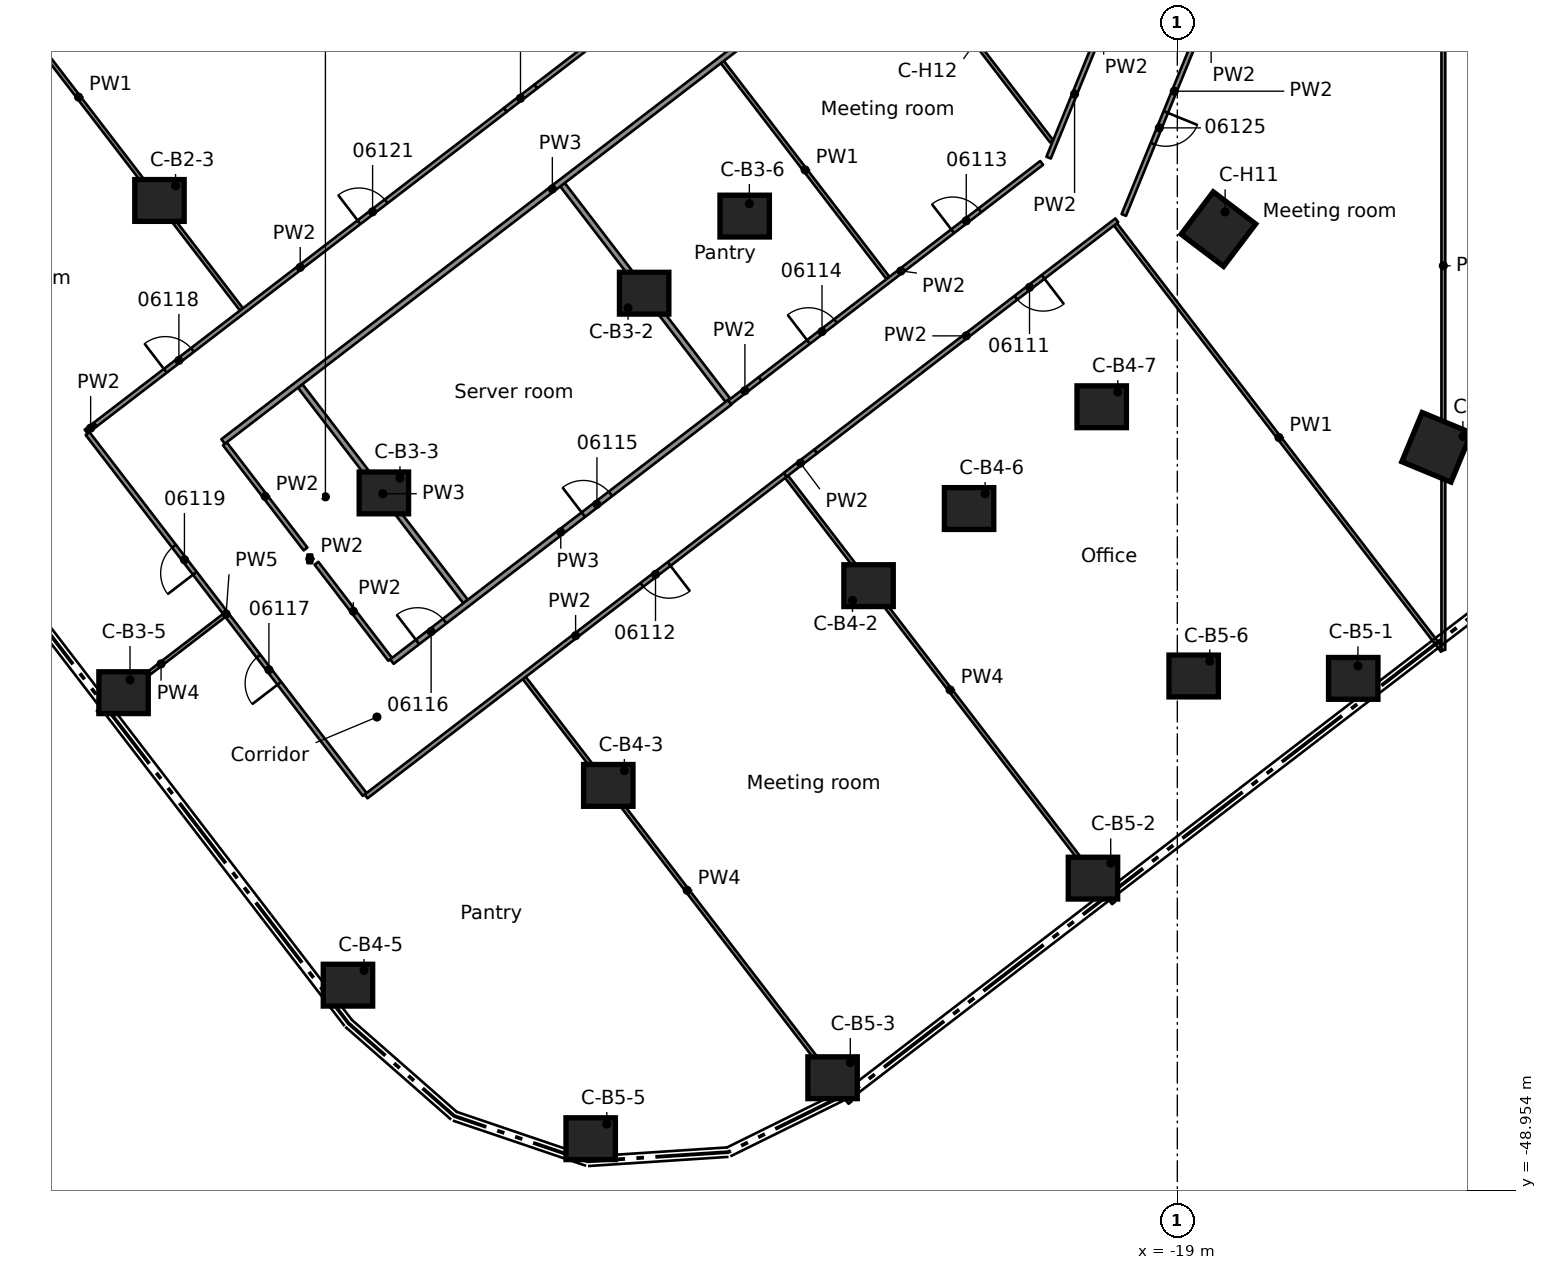
"""IFC4 building model, lengths in metres.
Left out: names, types, materials, properties, quantities, classifications, styles, units other than length and angle.
Written with IfcOpenShell. Run it as: python <this file> out.ifc"""

import sys

from ifc_helpers import new_model, si_unit, direction, frame, frame_2d, origin, origin_2d, place, context, subcontext, project, spatial, rectangle, extrude, element, fill, save


model = new_model("IFC4")
c1 = context("Model", 3, precision=1e-05, world=origin(), true_north=direction((0.0, 1.0)))
c2 = subcontext(c1, "Body", "Model", "MODEL_VIEW")
j1 = project(units=[si_unit("LENGTHUNIT", "METRE"), si_unit("PLANEANGLEUNIT", "RADIAN")], contexts=[c1])
p1 = place(None, origin())
s1 = spatial("IfcSite", under=j1, at=p1, CompositionType="ELEMENT")
p2 = place(p1, origin())
s2 = spatial("IfcBuilding", under=s1, at=p2, CompositionType="ELEMENT")
p3 = place(p2, frame((0.0, 0.0, 29.2)))
s3 = spatial("IfcBuildingStorey", under=s2, at=p3, CompositionType="ELEMENT", Elevation=29.2)
for number, where, z_axis, x_axis in (
    (1, (-45.784, -22.905, 0.0), (0.0, 0.0, 1.0), (1.0, 0.0, 0.0)),
    (2, (-33.03, -25.345, 0.0), (0.0, 0.0, 1.0), (1.0, 0.0, 0.0)),
    (3, (-39.879, -30.6, 0.0), (0.0, 0.0, 1.0), (1.0, 0.0, 0.0)),
    (4, (-46.729, -35.856, 0.0), (0.0, 0.0, 1.0), (1.0, 0.0, 0.0)),
    (5, (-30.385, -23.316, 0.0), (0.0, 0.0, 1.0), (1.0, 0.0, 0.0)),
    (6, (-27.125, -33.04, 0.0), (0.0, 0.0, 1.0), (1.0, 0.0, 0.0)),
    (7, (-33.974, -38.296, 0.0), (0.0, 0.0, 1.0), (1.0, 0.0, 0.0)),
    (8, (-40.824, -43.552, 0.0), (0.0, 0.0, 1.0), (1.0, 0.0, 0.0)),
    (9, (-24.48, -31.011, 0.0), (0.0, 0.0, 1.0), (1.0, 0.0, 0.0)),
    (10, (-20.99, -28.333, 0.0), (0.0, 0.0, 1.0), (1.0, 0.0, 0.0)),
    (11, (-14.371, -35.48, 0.0), (0.0, 0.0, 1.0), (1.0, 0.0, 0.0)),
    (12, (-21.22, -40.736, 0.0), (0.0, 0.0, 1.0), (1.0, 0.0, 0.0)),
    (13, (-28.072, -45.988, 0.0), (0.0, 0.0, 1.0), (1.0, 0.0, 0.0)),
    (14, (-34.437, -47.592, 0.0), (0.0, 0.0, 1.0), (1.0, 0.0, 0.0)),
    (15, (-18.57, -35.417, 0.0), (0.0, 0.0, 1.0), (1.0, 0.0, 0.0)),
):
    element("IfcColumn", number, at=place(p3, frame(where, z_axis=z_axis, x_axis=x_axis)), inside=s3, PredefinedType="COLUMN", context=c2, shape_type="SweptSolid", body=[
        extrude(rectangle(XDim=1.3, YDim=1.1, at=origin_2d()), origin(), (0.0, 0.0, 1.0), 4.1),
    ])
for number, where, z_axis, x_axis in (
    (16, (-12.178, -29.4, 0.0), (0.0, 0.0, 1.0), (-0.383, -0.924, 0.0)),
    (17, (-17.919, -23.659, 0.0), (0.0, 0.0, 1.0), (-0.604, -0.797, 0.0)),
):
    element("IfcColumn", number, at=place(p3, frame(where, z_axis=z_axis, x_axis=x_axis)), inside=s3, PredefinedType="COLUMN", context=c2, shape_type="SweptSolid", body=[
        extrude(rectangle(XDim=1.4, YDim=1.4, at=origin_2d()), origin(), (0.0, 0.0, 1.0), 4.1),
    ])
p4 = place(p3, frame((-40.384, -38.535, 0.0), z_axis=(0.0, 0.0, 1.0), x_axis=(-0.609026744184, 0.793149686294, 0.0)))
e18 = element("IfcWall", 18, at=p4, inside=s3, PredefinedType="PARTITIONING", context=c2, shape_type="SweptSolid", body=[
    extrude(rectangle(XDim=11.975, YDim=0.125, at=frame_2d((5.987, 0.0))), origin(), (0.0, 0.0, 1.0), 3.049),
])
p5 = place(p4, frame((3.688, 0.0, 0.0)))
e19 = element("IfcOpeningElement", 19, at=p5, cuts=e18, PredefinedType="OPENING", context=c2, shape_type="SweptSolid", body=[
    extrude(rectangle(XDim=0.9, YDim=2.1, at=frame_2d((0.45, 1.05))), frame((0.0, 0.073, 0.0), z_axis=(0.0, -1.0, 0.0), x_axis=(1.0, 0.0, 0.0)), (0.0, 0.0, 1.0), 0.145),
])
p6 = place(p4, frame((7.338, 0.0, 0.0)))
e20 = element("IfcOpeningElement", 20, at=p6, cuts=e18, PredefinedType="OPENING", context=c2, shape_type="SweptSolid", body=[
    extrude(rectangle(XDim=0.9, YDim=2.1, at=frame_2d((0.45, 1.05))), frame((0.0, 0.073, 0.0), z_axis=(0.0, -1.0, 0.0), x_axis=(1.0, 0.0, 0.0)), (0.0, 0.0, 1.0), 0.145),
])
p7 = place(p3, frame((-44.064, -29.307, 0.0), z_axis=(0.0, 0.0, 1.0), x_axis=(0.608587271244, -0.793486945879, 0.0)))
e21 = element("IfcWall", 21, at=p7, inside=s3, PredefinedType="PARTITIONING", context=c2, shape_type="SweptSolid", body=[
    extrude(rectangle(XDim=3.489, YDim=0.125, at=frame_2d((1.744, 0.0))), origin(), (0.0, 0.0, 1.0), 3.66),
])
p8 = place(p3, frame((-41.653, -32.45, 0.0), z_axis=(0.0, 0.0, 1.0), x_axis=(0.60867753108, -0.793417710389, 0.0)))
e22 = element("IfcWall", 22, at=p8, inside=s3, PredefinedType="PARTITIONING", context=c2, shape_type="SweptSolid", body=[
    extrude(rectangle(XDim=3.188, YDim=0.125, at=frame_2d((1.594, 0.0))), origin(), (0.0, 0.0, 1.0), 3.66),
])
p9 = place(p3, frame((-52.2, -14.599, 0.0), z_axis=(0.0, 0.0, 1.0), x_axis=(0.608818023879, -0.793309910312, 0.0)))
e23 = element("IfcWall", 23, at=p9, inside=s3, PredefinedType="PARTITIONING", context=c2, shape_type="SweptSolid", body=[
    extrude(rectangle(XDim=14.081, YDim=0.1, at=frame_2d((7.041, 0.0))), origin(), (0.0, 0.0, 1.0), 3.66),
])
p10 = place(p3, frame((-42.081, -27.786, 0.0), z_axis=(0.0, 0.0, 1.0), x_axis=(0.608779288924, -0.793339635577, 0.0)))
e24 = element("IfcWall", 24, at=p10, inside=s3, PredefinedType="PARTITIONING", context=c2, shape_type="SweptSolid", body=[
    extrude(rectangle(XDim=7.147, YDim=0.15, at=frame_2d((3.574, 0.0))), origin(), (0.0, 0.0, 1.0), 3.66),
])
p11 = place(p3, frame((-36.184, -35.471, 0.0), z_axis=(0.0, 0.0, 1.0), x_axis=(0.608732507749, -0.793375531517, 0.0)))
e25 = element("IfcWall", 25, at=p11, inside=s3, PredefinedType="PARTITIONING", context=c2, shape_type="SweptSolid", body=[
    extrude(rectangle(XDim=14.082, YDim=0.1, at=frame_2d((7.041, 0.0))), origin(), (0.0, 0.0, 1.0), 3.025),
])
p12 = place(p3, frame((-35.179, -22.489, 0.0), z_axis=(0.0, 0.0, 1.0), x_axis=(0.608729798771, -0.793377610024, 0.0)))
e26 = element("IfcWall", 26, at=p12, inside=s3, PredefinedType="PARTITIONING", context=c2, shape_type="SweptSolid", body=[
    extrude(rectangle(XDim=7.148, YDim=0.15, at=frame_2d((3.574, 0.0))), origin(), (0.0, 0.0, 1.0), 3.66),
])
p13 = place(p3, frame((-29.282, -30.176, 0.0), z_axis=(0.0, 0.0, 1.0), x_axis=(0.608773787241, -0.793343857333, 0.0)))
e27 = element("IfcWall", 27, at=p13, inside=s3, PredefinedType="PARTITIONING", context=c2, shape_type="SweptSolid", body=[
    extrude(rectangle(XDim=14.135, YDim=0.1, at=frame_2d((7.067, 0.0))), origin(), (0.0, 0.0, 1.0), 3.025),
])
p14 = place(p3, frame((-30.975, -19.261, 0.0), z_axis=(0.0, 0.0, 1.0), x_axis=(0.60876639971, -0.793349526113, 0.0)))
e28 = element("IfcWall", 28, at=p14, inside=s3, PredefinedType="PARTITIONING", context=c2, shape_type="SweptSolid", body=[
    extrude(rectangle(XDim=7.162, YDim=0.1, at=frame_2d((3.581, 0.0))), origin(), (0.0, 0.0, 1.0), 3.66),
])
p15 = place(p3, frame((-26.44, -15.962, 0.0), z_axis=(0.0, 0.0, 1.0), x_axis=(0.608697215762, -0.79340260872, 0.0)))
e29 = element("IfcWall", 29, at=p15, inside=s3, PredefinedType="PARTITIONING", context=c2, shape_type="SweptSolid", body=[
    extrude(rectangle(XDim=6.79, YDim=0.1, at=frame_2d((3.395, 0.0))), origin(), (0.0, 0.0, 1.0), 3.66),
])
p16 = place(p3, frame((-20.629, -23.535, 0.0), z_axis=(0.0, 0.0, 1.0), x_axis=(0.608775561638, -0.793342495743, 0.0)))
e30 = element("IfcWall", 30, at=p16, inside=s3, PredefinedType="PARTITIONING", context=c2, shape_type="SweptSolid", body=[
    extrude(rectangle(XDim=14.136, YDim=0.1, at=frame_2d((7.068, 0.0))), origin(), (0.0, 0.0, 1.0), 3.66),
])
p17 = place(p3, frame((-29.32, -30.124, 0.0), z_axis=(0.0, 0.0, 1.0), x_axis=(0.793776779764, 0.608209194198, 0.0)))
e31 = element("IfcWall", 31, at=p17, inside=s3, PredefinedType="PARTITIONING", context=c2, shape_type="SweptSolid", body=[
    extrude(rectangle(XDim=1.014, YDim=0.125, at=frame_2d((0.507, 0.0))), origin(), (0.0, 0.0, 1.0), 3.66),
])
p18 = place(p3, frame((-29.32, -30.127, 0.0), z_axis=(0.0, 0.0, 1.0), x_axis=(-0.793456491448, -0.608626976217, 0.0)))
e32 = element("IfcWall", 32, at=p18, inside=s3, PredefinedType="PARTITIONING", context=c2, shape_type="SweptSolid", body=[
    extrude(rectangle(XDim=13.898, YDim=0.125, at=frame_2d((6.949, 0.0))), origin(), (0.0, 0.0, 1.0), 3.66),
])
p19 = place(p18, frame((3.849, 0.0, 0.0)))
e33 = element("IfcOpeningElement", 33, at=p19, cuts=e32, PredefinedType="OPENING", context=c2, shape_type="SweptSolid", body=[
    extrude(rectangle(XDim=0.9, YDim=2.1, at=frame_2d((0.45, 1.05))), frame((0.0, 0.073, 0.0), z_axis=(0.0, -1.0, 0.0), x_axis=(1.0, 0.0, 0.0)), (0.0, 0.0, 1.0), 0.145),
])
p20 = place(p3, frame((-20.593, -23.428, 0.0), z_axis=(0.0, 0.0, 1.0), x_axis=(-0.793332393454, -0.608788726486, 0.0)))
e34 = element("IfcWall", 34, at=p20, inside=s3, PredefinedType="PARTITIONING", context=c2, shape_type="SweptSolid", body=[
    extrude(rectangle(XDim=9.986, YDim=0.125, at=frame_2d((4.993, 0.0))), origin(), (0.0, 0.0, 1.0), 3.66),
])
p21 = place(p20, frame((2.445, 0.0, 0.0)))
e35 = element("IfcOpeningElement", 35, at=p21, cuts=e34, PredefinedType="OPENING", context=c2, shape_type="SweptSolid", body=[
    extrude(rectangle(XDim=0.9, YDim=2.1, at=frame_2d((0.45, 1.05))), frame((0.0, 0.073, 0.0), z_axis=(0.0, -1.0, 0.0), x_axis=(1.0, 0.0, 0.0)), (0.0, 0.0, 1.0), 0.145),
])
p22 = place(p3, frame((-30.782, -28.22, 0.0), z_axis=(0.0, 0.0, 1.0), x_axis=(0.793579274907, 0.608466872096, 0.0)))
e36 = element("IfcWall", 36, at=p22, inside=s3, PredefinedType="PARTITIONING", context=c2, shape_type="SweptSolid", body=[
    extrude(rectangle(XDim=1.016, YDim=0.125, at=frame_2d((0.508, 0.0))), origin(), (0.0, 0.0, 1.0), 3.66),
])
p23 = place(p3, frame((-39.667, -35.038, 0.0), z_axis=(0.0, 0.0, 1.0), x_axis=(0.793293656215, 0.608839202917, 0.0)))
e37 = element("IfcWall", 37, at=p23, inside=s3, PredefinedType="PARTITIONING", context=c2, shape_type="SweptSolid", body=[
    extrude(rectangle(XDim=11.2, YDim=0.15, at=frame_2d((5.6, 0.0))), origin(), (0.0, 0.0, 1.0), 3.66),
])
p24 = place(p23, frame((6.35, 0.0, 0.0)))
e38 = element("IfcOpeningElement", 38, at=p24, cuts=e37, PredefinedType="OPENING", context=c2, shape_type="SweptSolid", body=[
    extrude(rectangle(XDim=0.9, YDim=2.1, at=frame_2d((0.45, 1.05))), frame((0.0, 0.085, 0.0), z_axis=(0.0, -1.0, 0.0), x_axis=(1.0, 0.0, 0.0)), (0.0, 0.0, 1.0), 0.17),
])
p25 = place(p23, frame((0.85, 0.0, 0.0)))
e39 = element("IfcOpeningElement", 39, at=p25, cuts=e37, PredefinedType="OPENING", context=c2, shape_type="SweptSolid", body=[
    extrude(rectangle(XDim=0.9, YDim=2.1, at=frame_2d((0.45, 1.05))), frame((0.0, 0.085, 0.0), z_axis=(0.0, -1.0, 0.0), x_axis=(1.0, 0.0, 0.0)), (0.0, 0.0, 1.0), 0.17),
])
p26 = place(p3, frame((-29.976, -27.602, 0.0), z_axis=(0.0, 0.0, 1.0), x_axis=(0.793237948633, 0.608911780843, 0.0)))
e40 = element("IfcWall", 40, at=p26, inside=s3, PredefinedType="PARTITIONING", context=c2, shape_type="SweptSolid", body=[
    extrude(rectangle(XDim=9.336, YDim=0.125, at=frame_2d((4.668, 0.0))), origin(), (0.0, 0.0, 1.0), 3.66),
])
p27 = place(p26, frame((6.385, 0.0, 0.0)))
e41 = element("IfcOpeningElement", 41, at=p27, cuts=e40, PredefinedType="OPENING", context=c2, shape_type="SweptSolid", body=[
    extrude(rectangle(XDim=0.9, YDim=2.1, at=frame_2d((0.45, 1.05))), frame((0.0, 0.073, 0.0), z_axis=(0.0, -1.0, 0.0), x_axis=(1.0, 0.0, 0.0)), (0.0, 0.0, 1.0), 0.145),
])
p28 = place(p26, frame((1.6, 0.0, 0.0)))
e42 = element("IfcOpeningElement", 42, at=p28, cuts=e40, PredefinedType="OPENING", context=c2, shape_type="SweptSolid", body=[
    extrude(rectangle(XDim=0.9, YDim=2.1, at=frame_2d((0.45, 1.05))), frame((0.0, 0.073, 0.0), z_axis=(0.0, -1.0, 0.0), x_axis=(1.0, 0.0, 0.0)), (0.0, 0.0, 1.0), 0.145),
])
p29 = place(p3, frame((-47.403, -36.374, 0.0), z_axis=(0.0, 0.0, 1.0), x_axis=(0.793154740431, 0.609020162008, 0.0)))
e43 = element("IfcWall", 43, at=p29, inside=s3, PredefinedType="PARTITIONING", context=c2, shape_type="SweptSolid", body=[
    extrude(rectangle(XDim=4.187, YDim=0.1, at=frame_2d((2.094, 0.0))), origin(), (0.0, 0.0, 1.0), 3.025),
])
p30 = place(p3, frame((-44.11, -29.247, 0.0), z_axis=(0.0, 0.0, 1.0), x_axis=(0.793471030698, 0.608608021179, 0.0)))
e44 = element("IfcWall", 44, at=p30, inside=s3, PredefinedType="PARTITIONING", context=c2, shape_type="SweptSolid", body=[
    extrude(rectangle(XDim=21.838, YDim=0.15, at=frame_2d((10.919, 0.0))), origin(), (0.0, 0.0, 1.0), 3.66),
])
p31 = place(p3, frame((-36.687, -20.524, 0.0), z_axis=(0.0, 0.0, 1.0), x_axis=(0.793579274907, 0.608466872096, 0.0)))
e45 = element("IfcWall", 45, at=p31, inside=s3, PredefinedType="PARTITIONING", context=c2, shape_type="SweptSolid", body=[
    extrude(rectangle(XDim=1.016, YDim=0.125, at=frame_2d((0.508, 0.0))), origin(), (0.0, 0.0, 1.0), 3.66),
])
p32 = place(p3, frame((-47.476, -28.803, 0.0), z_axis=(0.0, 0.0, 1.0), x_axis=(0.793430085013, 0.608661400284, 0.0)))
e46 = element("IfcWall", 46, at=p32, inside=s3, PredefinedType="PARTITIONING", context=c2, shape_type="SweptSolid", body=[
    extrude(rectangle(XDim=13.6, YDim=0.125, at=frame_2d((6.8, 0.0))), origin(), (0.0, 0.0, 1.0), 3.66),
])
p33 = place(p32, frame((2.326, 0.0, 0.0)))
e47 = element("IfcOpeningElement", 47, at=p33, cuts=e46, PredefinedType="OPENING", context=c2, shape_type="SweptSolid", body=[
    extrude(rectangle(XDim=0.9, YDim=2.1, at=frame_2d((0.45, 1.05))), frame((0.0, 0.073, 0.0), z_axis=(0.0, -1.0, 0.0), x_axis=(1.0, 0.0, 0.0)), (0.0, 0.0, 1.0), 0.145),
])
p34 = place(p32, frame((8.75, 0.0, 0.0)))
e48 = element("IfcOpeningElement", 48, at=p34, cuts=e46, PredefinedType="OPENING", context=c2, shape_type="SweptSolid", body=[
    extrude(rectangle(XDim=0.9, YDim=2.1, at=frame_2d((0.45, 1.05))), frame((0.0, 0.073, 0.0), z_axis=(0.0, -1.0, 0.0), x_axis=(1.0, 0.0, 0.0)), (0.0, 0.0, 1.0), 0.145),
])
p35 = place(p3, frame((-35.881, -19.906, 0.0), z_axis=(0.0, 0.0, 1.0), x_axis=(0.793491146474, 0.608581794394, 0.0)))
e49 = element("IfcWall", 49, at=p35, inside=s3, PredefinedType="PARTITIONING", context=c2, shape_type="SweptSolid", body=[
    extrude(rectangle(XDim=9.892, YDim=0.125, at=frame_2d((4.946, 0.0))), origin(), (0.0, 0.0, 1.0), 3.66),
])
p36 = place(p35, frame((6.634, 0.0, 0.0)))
e50 = element("IfcOpeningElement", 50, at=p36, cuts=e49, PredefinedType="OPENING", context=c2, shape_type="SweptSolid", body=[
    extrude(rectangle(XDim=1.1, YDim=2.1, at=frame_2d((0.55, 1.05))), frame((0.0, 0.073, 0.0), z_axis=(0.0, -1.0, 0.0), x_axis=(1.0, 0.0, 0.0)), (0.0, 0.0, 1.0), 0.145),
])
p37 = place(p3, frame((-47.714, -28.986, 0.0), z_axis=(0.0, 0.0, 1.0), x_axis=(0.792623989105, 0.60971076085, 0.0)))
e51 = element("IfcWall", 51, at=p37, inside=s3, PredefinedType="PARTITIONING", context=c2, shape_type="SweptSolid", body=[
    extrude(rectangle(XDim=0.3, YDim=0.125, at=frame_2d((0.15, 0.0))), origin(), (0.0, 0.0, 1.0), 3.66),
])
p38 = place(p3, frame((-18.51, -18.634, 0.0), z_axis=(0.0, 0.0, 1.0), x_axis=(-0.377847706778, -0.925867760797, 0.0)))
e52 = element("IfcWall", 52, at=p38, inside=s3, PredefinedType="PARTITIONING", context=c2, shape_type="SweptSolid", body=[
    extrude(rectangle(XDim=5.026, YDim=0.125, at=frame_2d((2.513, 0.0))), origin(), (0.0, 0.0, 1.0), 3.66),
])
p39 = place(p38, frame((2.1, 0.0, 0.0)))
e53 = element("IfcOpeningElement", 53, at=p39, cuts=e52, PredefinedType="OPENING", context=c2, shape_type="SweptSolid", body=[
    extrude(rectangle(XDim=0.9, YDim=2.1, at=frame_2d((0.45, 1.05))), frame((0.0, 0.073, 0.0), z_axis=(0.0, -1.0, 0.0), x_axis=(1.0, 0.0, 0.0)), (0.0, 0.0, 1.0), 0.145),
])
p40 = place(p3, frame((-22.387, -21.778, 0.0), z_axis=(0.0, 0.0, 1.0), x_axis=(0.377843834017, 0.925869341265, 0.0)))
e54 = element("IfcWall", 54, at=p40, inside=s3, PredefinedType="PARTITIONING", context=c2, shape_type="SweptSolid", body=[
    extrude(rectangle(XDim=3.615, YDim=0.125, at=frame_2d((1.808, 0.0))), origin(), (0.0, 0.0, 1.0), 3.66),
])
p41 = place(p3, frame((-12.0, -34.733, 0.0), z_axis=(0.0, 0.0, 1.0), x_axis=(0.0, 1.0, 0.0)))
e55 = element("IfcWall", 55, at=p41, inside=s3, PredefinedType="PARTITIONING", context=c2, shape_type="SweptSolid", body=[
    extrude(rectangle(XDim=20.219, YDim=0.1, at=frame_2d((10.109, 0.0))), origin(), (0.0, 0.0, 1.0), 3.025),
])
p42 = place(p3, frame((-41.828, -32.449, 0.0), z_axis=(0.0, 0.0, 1.0), x_axis=(0.0, 1.0, 0.0)))
e56 = element("IfcWall", 56, at=p42, inside=s3, PredefinedType="PARTITIONING", context=c2, shape_type="SweptSolid", body=[
    extrude(rectangle(XDim=0.228, YDim=0.125, at=frame_2d((0.114, 0.0))), origin(), (0.0, 0.0, 1.0), 3.66),
])
p43 = place(p21, origin())
e57 = element("IfcDoor", 57, at=p43, inside=s3, OperationType="SINGLE_SWING_LEFT", PredefinedType="DOOR", context=c2, shape_type="SweptSolid", body=[
    extrude(rectangle(XDim=0.9, YDim=2.1, at=frame_2d((0.45, 1.05))), frame((0.0, 0.025, 0.0), z_axis=(0.0, -1.0, 0.0), x_axis=(1.0, 0.0, 0.0)), (0.0, 0.0, 1.0), 0.05),
])
fill(e35, e57)
p44 = place(p19, origin())
e58 = element("IfcDoor", 58, at=p44, inside=s3, OperationType="SINGLE_SWING_LEFT", PredefinedType="DOOR", context=c2, shape_type="SweptSolid", body=[
    extrude(rectangle(XDim=0.9, YDim=2.1, at=frame_2d((0.45, 1.05))), frame((0.0, 0.025, 0.0), z_axis=(0.0, -1.0, 0.0), x_axis=(1.0, 0.0, 0.0)), (0.0, 0.0, 1.0), 0.05),
])
fill(e33, e58)
p45 = place(p27, origin())
e59 = element("IfcDoor", 59, at=p45, inside=s3, OperationType="SINGLE_SWING_RIGHT", PredefinedType="DOOR", context=c2, shape_type="SweptSolid", body=[
    extrude(rectangle(XDim=0.9, YDim=2.1, at=frame_2d((0.45, 1.05))), frame((0.0, 0.025, 0.0), z_axis=(0.0, -1.0, 0.0), x_axis=(1.0, 0.0, 0.0)), (0.0, 0.0, 1.0), 0.05),
])
fill(e41, e59)
p46 = place(p28, origin())
e60 = element("IfcDoor", 60, at=p46, inside=s3, OperationType="SINGLE_SWING_LEFT", PredefinedType="DOOR", context=c2, shape_type="SweptSolid", body=[
    extrude(rectangle(XDim=0.9, YDim=2.1, at=frame_2d((0.45, 1.05))), frame((0.0, 0.025, 0.0), z_axis=(0.0, -1.0, 0.0), x_axis=(1.0, 0.0, 0.0)), (0.0, 0.0, 1.0), 0.05),
])
fill(e42, e60)
p47 = place(p24, origin())
e61 = element("IfcDoor", 61, at=p47, inside=s3, OperationType="SINGLE_SWING_RIGHT", PredefinedType="DOOR", context=c2, shape_type="SweptSolid", body=[
    extrude(rectangle(XDim=0.9, YDim=2.1, at=frame_2d((0.45, 1.05))), frame((0.0, 0.025, 0.0), z_axis=(0.0, -1.0, 0.0), x_axis=(1.0, 0.0, 0.0)), (0.0, 0.0, 1.0), 0.05),
])
fill(e38, e61)
p48 = place(p25, origin())
e62 = element("IfcDoor", 62, at=p48, inside=s3, OperationType="SINGLE_SWING_LEFT", PredefinedType="DOOR", context=c2, shape_type="SweptSolid", body=[
    extrude(rectangle(XDim=0.9, YDim=2.1, at=frame_2d((0.45, 1.05))), frame((0.0, 0.025, 0.0), z_axis=(0.0, -1.0, 0.0), x_axis=(1.0, 0.0, 0.0)), (0.0, 0.0, 1.0), 0.05),
])
fill(e39, e62)
p49 = place(p5, origin())
e63 = element("IfcDoor", 63, at=p49, inside=s3, OperationType="SINGLE_SWING_LEFT", PredefinedType="DOOR", context=c2, shape_type="SweptSolid", body=[
    extrude(rectangle(XDim=0.9, YDim=2.1, at=frame_2d((0.45, 1.05))), frame((0.0, 0.025, 0.0), z_axis=(0.0, -1.0, 0.0), x_axis=(1.0, 0.0, 0.0)), (0.0, 0.0, 1.0), 0.05),
])
fill(e19, e63)
p50 = place(p33, origin())
e64 = element("IfcDoor", 64, at=p50, inside=s3, OperationType="SINGLE_SWING_LEFT", PredefinedType="DOOR", context=c2, shape_type="SweptSolid", body=[
    extrude(rectangle(XDim=0.9, YDim=2.1, at=frame_2d((0.45, 1.05))), frame((0.0, 0.025, 0.0), z_axis=(0.0, -1.0, 0.0), x_axis=(1.0, 0.0, 0.0)), (0.0, 0.0, 1.0), 0.05),
])
fill(e47, e64)
p51 = place(p6, origin())
e65 = element("IfcDoor", 65, at=p51, inside=s3, OperationType="SINGLE_SWING_RIGHT", PredefinedType="DOOR", context=c2, shape_type="SweptSolid", body=[
    extrude(rectangle(XDim=0.9, YDim=2.1, at=frame_2d((0.45, 1.05))), frame((0.0, 0.025, 0.0), z_axis=(0.0, -1.0, 0.0), x_axis=(1.0, 0.0, 0.0)), (0.0, 0.0, 1.0), 0.05),
])
fill(e20, e65)
p52 = place(p34, origin())
e66 = element("IfcDoor", 66, at=p52, inside=s3, OperationType="SINGLE_SWING_RIGHT", PredefinedType="DOOR", context=c2, shape_type="SweptSolid", body=[
    extrude(rectangle(XDim=0.9, YDim=2.1, at=frame_2d((0.45, 1.05))), frame((0.0, 0.025, 0.0), z_axis=(0.0, -1.0, 0.0), x_axis=(1.0, 0.0, 0.0)), (0.0, 0.0, 1.0), 0.05),
])
fill(e48, e66)
p53 = place(p39, origin())
e67 = element("IfcDoor", 67, at=p53, inside=s3, OperationType="SINGLE_SWING_RIGHT", PredefinedType="DOOR", context=c2, shape_type="SweptSolid", body=[
    extrude(rectangle(XDim=0.9, YDim=2.1, at=frame_2d((0.45, 1.05))), frame((0.0, 0.025, 0.0), z_axis=(0.0, -1.0, 0.0), x_axis=(1.0, 0.0, 0.0)), (0.0, 0.0, 1.0), 0.05),
])
fill(e53, e67)
save(model, sys.argv[1])
